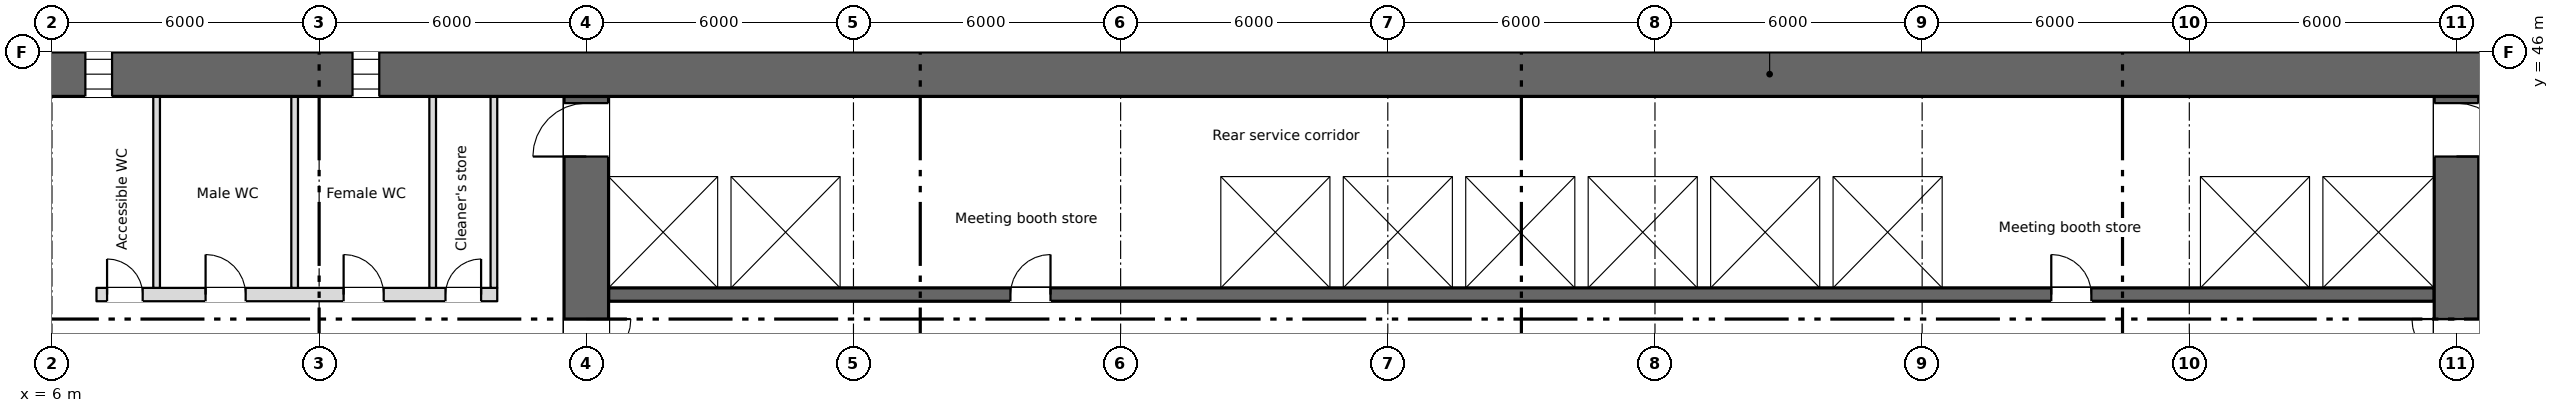
"""IFC4 building model, lengths in metres.
Left out: names, types, materials, properties, quantities, classifications, styles, units other than length and angle.
Written with IfcOpenShell. Run it as: python <this file> out.ifc"""

import sys

from ifc_helpers import new_model, si_unit, direction, frame, frame_2d, origin, place, context, subcontext, project, spatial, rectangle, extrude, element, fill, save


model = new_model("IFC4")
c1 = context("Model", 3, precision=1e-05, world=origin(), true_north=direction((0.0, 1.0)))
c2 = subcontext(c1, "Body", "Model", "MODEL_VIEW")
j1 = project(units=[si_unit("LENGTHUNIT", "METRE"), si_unit("PLANEANGLEUNIT", "RADIAN")], contexts=[c1])
p1 = place(None, origin())
s1 = spatial("IfcSite", under=j1, at=p1, CompositionType="ELEMENT")
p2 = place(p1, origin())
s2 = spatial("IfcBuilding", under=s1, at=p2, CompositionType="ELEMENT")
p3 = place(p2, frame((0.0, 0.0, 26.25)))
s3 = spatial("IfcBuildingStorey", under=s2, at=p3, CompositionType="ELEMENT", Elevation=26.25)
p4 = place(p3, frame((5.55, 45.5, 0.0), z_axis=(0.0, 0.0, 1.0), x_axis=(1.0, 0.0, 0.0)))
e1 = element("IfcWall", 1, at=p4, inside=s3, PredefinedType="SHEAR", context=c2, shape_type="SweptSolid", body=[
    extrude(rectangle(XDim=66.9, YDim=1.0, at=frame_2d((33.45, 0.0))), origin(), (0.0, 0.0, 1.0), 3.35),
])
p5 = place(p4, frame((1.2, 0.0, 0.6)))
e2 = element("IfcOpeningElement", 2, at=p5, cuts=e1, PredefinedType="OPENING", context=c2, shape_type="SweptSolid", body=[
    extrude(rectangle(XDim=0.6, YDim=2.4, at=frame_2d((0.3, 1.2))), frame((0.0, 0.51, 0.0), z_axis=(0.0, -1.0, 0.0), x_axis=(1.0, 0.0, 0.0)), (0.0, 0.0, 1.0), 1.02),
])
p6 = place(p4, frame((7.2, 0.0, 0.6)))
e3 = element("IfcOpeningElement", 3, at=p6, cuts=e1, PredefinedType="OPENING", context=c2, shape_type="SweptSolid", body=[
    extrude(rectangle(XDim=0.6, YDim=2.4, at=frame_2d((0.3, 1.2))), frame((0.0, 0.51, 0.0), z_axis=(0.0, -1.0, 0.0), x_axis=(1.0, 0.0, 0.0)), (0.0, 0.0, 1.0), 1.02),
])
p7 = place(p3, frame((6.85, 28.4, 0.0), z_axis=(0.0, 0.0, 1.0), x_axis=(0.0, 1.0, 0.0)))
e4 = element("IfcWall", 4, at=p7, inside=s3, PredefinedType="SHEAR", context=c2, shape_type="SweptSolid", body=[
    extrude(rectangle(XDim=16.6, YDim=0.3, at=frame_2d((8.3, 0.0))), origin(), (0.0, 0.0, 1.0), 3.35),
])
p8 = place(p3, frame((18.0, 28.4, 0.0), z_axis=(0.0, 0.0, 1.0), x_axis=(0.0, 1.0, 0.0)))
e5 = element("IfcWall", 5, at=p8, inside=s3, PredefinedType="SHEAR", context=c2, shape_type="SweptSolid", body=[
    extrude(rectangle(XDim=16.6, YDim=1.0, at=frame_2d((8.3, 0.0))), origin(), (0.0, 0.0, 1.0), 3.35),
])
p9 = place(p8, frame((9.6, 0.0, 0.0)))
e6 = element("IfcOpeningElement", 6, at=p9, cuts=e5, PredefinedType="OPENING", context=c2, shape_type="SweptSolid", body=[
    extrude(rectangle(XDim=2.0, YDim=2.1, at=frame_2d((1.0, 1.05))), frame((0.0, 0.51, 0.0), z_axis=(0.0, -1.0, 0.0), x_axis=(1.0, 0.0, 0.0)), (0.0, 0.0, 1.0), 1.02),
])
p10 = place(p8, frame((15.25, 0.0, 0.0)))
e7 = element("IfcOpeningElement", 7, at=p10, cuts=e5, PredefinedType="OPENING", context=c2, shape_type="SweptSolid", body=[
    extrude(rectangle(XDim=1.2, YDim=2.1, at=frame_2d((0.6, 1.05))), frame((0.0, 0.51, 0.0), z_axis=(0.0, -1.0, 0.0), x_axis=(1.0, 0.0, 0.0)), (0.0, 0.0, 1.0), 1.02),
])
p11 = place(p3, frame((60.0, 28.4, 0.0), z_axis=(0.0, 0.0, 1.0), x_axis=(0.0, 1.0, 0.0)))
e8 = element("IfcWall", 8, at=p11, inside=s3, PredefinedType="SHEAR", context=c2, shape_type="SweptSolid", body=[
    extrude(rectangle(XDim=16.6, YDim=1.0, at=frame_2d((8.3, 0.0))), origin(), (0.0, 0.0, 1.0), 3.35),
])
p12 = place(p11, frame((9.6, 0.0, 0.0)))
e9 = element("IfcOpeningElement", 9, at=p12, cuts=e8, PredefinedType="OPENING", context=c2, shape_type="SweptSolid", body=[
    extrude(rectangle(XDim=2.0, YDim=2.1, at=frame_2d((1.0, 1.05))), frame((0.0, 0.51, 0.0), z_axis=(0.0, -1.0, 0.0), x_axis=(1.0, 0.0, 0.0)), (0.0, 0.0, 1.0), 1.02),
])
p13 = place(p11, frame((15.25, 0.0, 0.0)))
e10 = element("IfcOpeningElement", 10, at=p13, cuts=e8, PredefinedType="OPENING", context=c2, shape_type="SweptSolid", body=[
    extrude(rectangle(XDim=1.2, YDim=2.1, at=frame_2d((0.6, 1.05))), frame((0.0, 0.51, 0.0), z_axis=(0.0, -1.0, 0.0), x_axis=(1.0, 0.0, 0.0)), (0.0, 0.0, 1.0), 1.02),
])
p14 = place(p3, frame((18.5, 40.55, 0.0), z_axis=(0.0, 0.0, 1.0), x_axis=(1.0, 0.0, 0.0)))
e11 = element("IfcWall", 11, at=p14, inside=s3, PredefinedType="SHEAR", context=c2, shape_type="SweptSolid", body=[
    extrude(rectangle(XDim=41.0, YDim=0.3, at=frame_2d((20.5, 0.0))), origin(), (0.0, 0.0, 1.0), 3.35),
])
p15 = place(p14, frame((9.025, 0.0, 0.0)))
e12 = element("IfcOpeningElement", 12, at=p15, cuts=e11, PredefinedType="OPENING", context=c2, shape_type="SweptSolid", body=[
    extrude(rectangle(XDim=0.9, YDim=2.1, at=frame_2d((0.45, 1.05))), frame((0.0, 0.16, 0.0), z_axis=(0.0, -1.0, 0.0), x_axis=(1.0, 0.0, 0.0)), (0.0, 0.0, 1.0), 0.32),
])
p16 = place(p14, frame((32.4, 0.0, 0.0)))
e13 = element("IfcOpeningElement", 13, at=p16, cuts=e11, PredefinedType="OPENING", context=c2, shape_type="SweptSolid", body=[
    extrude(rectangle(XDim=0.9, YDim=2.1, at=frame_2d((0.45, 1.05))), frame((0.0, 0.16, 0.0), z_axis=(0.0, -1.0, 0.0), x_axis=(1.0, 0.0, 0.0)), (0.0, 0.0, 1.0), 0.32),
])
p17 = place(p14, frame((14.425, 0.0, 0.0)))
e14 = element("IfcOpeningElement", 14, at=p17, cuts=e11, PredefinedType="OPENING", context=c2, shape_type="SweptSolid", body=[
    extrude(rectangle(XDim=1.1, YDim=2.1, at=frame_2d((0.55, 1.05))), frame((0.0, 0.16, 0.0), z_axis=(0.0, -1.0, 0.0), x_axis=(1.0, 0.0, 0.0)), (0.0, 0.0, 1.0), 0.32),
])
p18 = place(p14, frame((17.175, 0.0, 0.0)))
e15 = element("IfcOpeningElement", 15, at=p18, cuts=e11, PredefinedType="OPENING", context=c2, shape_type="SweptSolid", body=[
    extrude(rectangle(XDim=1.1, YDim=2.1, at=frame_2d((0.55, 1.05))), frame((0.0, 0.16, 0.0), z_axis=(0.0, -1.0, 0.0), x_axis=(1.0, 0.0, 0.0)), (0.0, 0.0, 1.0), 0.32),
])
p19 = place(p14, frame((19.925, 0.0, 0.0)))
e16 = element("IfcOpeningElement", 16, at=p19, cuts=e11, PredefinedType="OPENING", context=c2, shape_type="SweptSolid", body=[
    extrude(rectangle(XDim=1.1, YDim=2.1, at=frame_2d((0.55, 1.05))), frame((0.0, 0.16, 0.0), z_axis=(0.0, -1.0, 0.0), x_axis=(1.0, 0.0, 0.0)), (0.0, 0.0, 1.0), 0.32),
])
p20 = place(p14, frame((22.675, 0.0, 0.0)))
e17 = element("IfcOpeningElement", 17, at=p20, cuts=e11, PredefinedType="OPENING", context=c2, shape_type="SweptSolid", body=[
    extrude(rectangle(XDim=1.1, YDim=2.1, at=frame_2d((0.55, 1.05))), frame((0.0, 0.16, 0.0), z_axis=(0.0, -1.0, 0.0), x_axis=(1.0, 0.0, 0.0)), (0.0, 0.0, 1.0), 0.32),
])
p21 = place(p14, frame((36.375, 0.0, 0.0)))
e18 = element("IfcOpeningElement", 18, at=p21, cuts=e11, PredefinedType="OPENING", context=c2, shape_type="SweptSolid", body=[
    extrude(rectangle(XDim=1.2, YDim=2.1, at=frame_2d((0.6, 1.05))), frame((0.0, 0.16, 0.0), z_axis=(0.0, -1.0, 0.0), x_axis=(1.0, 0.0, 0.0)), (0.0, 0.0, 1.0), 0.32),
])
p22 = place(p14, frame((39.15, 0.0, 0.0)))
e19 = element("IfcOpeningElement", 19, at=p22, cuts=e11, PredefinedType="OPENING", context=c2, shape_type="SweptSolid", body=[
    extrude(rectangle(XDim=1.2, YDim=2.1, at=frame_2d((0.6, 1.05))), frame((0.0, 0.16, 0.0), z_axis=(0.0, -1.0, 0.0), x_axis=(1.0, 0.0, 0.0)), (0.0, 0.0, 1.0), 0.32),
])
p23 = place(p3, frame((18.5, 43.35, 0.0), z_axis=(0.0, 0.0, 1.0), x_axis=(1.0, 0.0, 0.0)))
e20 = element("IfcWall", 20, at=p23, inside=s3, PredefinedType="SHEAR", context=c2, shape_type="SweptSolid", body=[
    extrude(rectangle(XDim=41.0, YDim=0.3, at=frame_2d((20.5, 0.0))), origin(), (0.0, 0.0, 1.0), 3.35),
])
p24 = place(p3, frame((7.0, 40.55, 0.0), z_axis=(0.0, 0.0, 1.0), x_axis=(1.0, 0.0, 0.0)))
e21 = element("IfcWall", 21, at=p24, inside=s3, PredefinedType="PARTITIONING", context=c2, shape_type="SweptSolid", body=[
    extrude(rectangle(XDim=9.0, YDim=0.3, at=frame_2d((4.5, 0.0))), origin(), (0.0, 0.0, 1.0), 3.35),
])
p25 = place(p24, frame((0.238, 0.0, 0.0)))
e22 = element("IfcOpeningElement", 22, at=p25, cuts=e21, PredefinedType="OPENING", context=c2, shape_type="SweptSolid", body=[
    extrude(rectangle(XDim=0.8, YDim=2.1, at=frame_2d((0.4, 1.05))), frame((0.0, 0.16, 0.0), z_axis=(0.0, -1.0, 0.0), x_axis=(1.0, 0.0, 0.0)), (0.0, 0.0, 1.0), 0.32),
])
p26 = place(p24, frame((2.45, 0.0, 0.0)))
e23 = element("IfcOpeningElement", 23, at=p26, cuts=e21, PredefinedType="OPENING", context=c2, shape_type="SweptSolid", body=[
    extrude(rectangle(XDim=0.9, YDim=2.1, at=frame_2d((0.45, 1.05))), frame((0.0, 0.16, 0.0), z_axis=(0.0, -1.0, 0.0), x_axis=(1.0, 0.0, 0.0)), (0.0, 0.0, 1.0), 0.32),
])
p27 = place(p24, frame((5.55, 0.0, 0.0)))
e24 = element("IfcOpeningElement", 24, at=p27, cuts=e21, PredefinedType="OPENING", context=c2, shape_type="SweptSolid", body=[
    extrude(rectangle(XDim=0.9, YDim=2.1, at=frame_2d((0.45, 1.05))), frame((0.0, 0.16, 0.0), z_axis=(0.0, -1.0, 0.0), x_axis=(1.0, 0.0, 0.0)), (0.0, 0.0, 1.0), 0.32),
])
p28 = place(p24, frame((7.837, 0.0, 0.0)))
e25 = element("IfcOpeningElement", 25, at=p28, cuts=e21, PredefinedType="OPENING", context=c2, shape_type="SweptSolid", body=[
    extrude(rectangle(XDim=0.8, YDim=2.1, at=frame_2d((0.4, 1.05))), frame((0.0, 0.16, 0.0), z_axis=(0.0, -1.0, 0.0), x_axis=(1.0, 0.0, 0.0)), (0.0, 0.0, 1.0), 0.32),
])
for number, where, z_axis, x_axis in (
    (26, (21.1, 40.7, 0.0), (0.0, 0.0, 1.0), (0.0, 1.0, 0.0)),
    (27, (23.85, 40.7, 0.0), (0.0, 0.0, 1.0), (0.0, 1.0, 0.0)),
    (28, (32.1, 40.7, 0.0), (0.0, 0.0, 1.0), (0.0, 1.0, 0.0)),
    (29, (34.85, 40.7, 0.0), (0.0, 0.0, 1.0), (0.0, 1.0, 0.0)),
    (30, (37.6, 40.7, 0.0), (0.0, 0.0, 1.0), (0.0, 1.0, 0.0)),
    (31, (40.35, 40.7, 0.0), (0.0, 0.0, 1.0), (0.0, 1.0, 0.0)),
    (32, (43.1, 40.7, 0.0), (0.0, 0.0, 1.0), (0.0, 1.0, 0.0)),
    (33, (45.85, 40.7, 0.0), (0.0, 0.0, 1.0), (0.0, 1.0, 0.0)),
    (34, (48.6, 40.7, 0.0), (0.0, 0.0, 1.0), (0.0, 1.0, 0.0)),
    (35, (54.1, 40.7, 0.0), (0.0, 0.0, 1.0), (0.0, 1.0, 0.0)),
    (36, (56.85, 40.7, 0.0), (0.0, 0.0, 1.0), (0.0, 1.0, 0.0)),
):
    element("IfcWall", number, at=place(p3, frame(where, z_axis=z_axis, x_axis=x_axis)), inside=s3, PredefinedType="SHEAR", context=c2, shape_type="SweptSolid", body=[
        extrude(rectangle(XDim=2.5, YDim=0.3, at=frame_2d((1.25, 0.0))), origin(), (0.0, 0.0, 1.0), 3.35),
    ])
for number, where, z_axis, x_axis in (
    (37, (15.925, 40.7, 0.0), (0.0, 0.0, 1.0), (0.0, 1.0, 0.0)),
    (38, (8.35, 40.7, 0.0), (0.0, 0.0, 1.0), (0.0, 1.0, 0.0)),
    (39, (11.45, 40.7, 0.0), (0.0, 0.0, 1.0), (0.0, 1.0, 0.0)),
    (40, (14.55, 40.7, 0.0), (0.0, 0.0, 1.0), (0.0, 1.0, 0.0)),
):
    element("IfcWall", number, at=place(p3, frame(where, z_axis=z_axis, x_axis=x_axis)), inside=s3, PredefinedType="PARTITIONING", context=c2, shape_type="SweptSolid", body=[
        extrude(rectangle(XDim=4.3, YDim=0.15, at=frame_2d((2.15, 0.0))), origin(), (0.0, 0.0, 1.0), 3.35),
    ])
p29 = place(p5, origin())
e41 = element("IfcWindow", 41, at=p29, inside=s3, PartitioningType="SINGLE_PANEL", PredefinedType="WINDOW", context=c2, shape_type="SweptSolid", body=[
    extrude(rectangle(XDim=0.6, YDim=2.4, at=frame_2d((0.3, 1.2))), frame((0.0, 0.03, 0.0), z_axis=(0.0, -1.0, 0.0), x_axis=(1.0, 0.0, 0.0)), (0.0, 0.0, 1.0), 0.06),
])
fill(e2, e41)
p30 = place(p6, origin())
e42 = element("IfcWindow", 42, at=p30, inside=s3, PartitioningType="SINGLE_PANEL", PredefinedType="WINDOW", context=c2, shape_type="SweptSolid", body=[
    extrude(rectangle(XDim=0.6, YDim=2.4, at=frame_2d((0.3, 1.2))), frame((0.0, 0.03, 0.0), z_axis=(0.0, -1.0, 0.0), x_axis=(1.0, 0.0, 0.0)), (0.0, 0.0, 1.0), 0.06),
])
fill(e3, e42)
p31 = place(p25, origin())
e43 = element("IfcDoor", 43, at=p31, inside=s3, OperationType="SINGLE_SWING_LEFT", PredefinedType="DOOR", context=c2, shape_type="SweptSolid", body=[
    extrude(rectangle(XDim=0.8, YDim=2.1, at=frame_2d((0.4, 1.05))), frame((0.0, 0.025, 0.0), z_axis=(0.0, -1.0, 0.0), x_axis=(1.0, 0.0, 0.0)), (0.0, 0.0, 1.0), 0.05),
])
fill(e22, e43)
p32 = place(p26, origin())
e44 = element("IfcDoor", 44, at=p32, inside=s3, OperationType="SINGLE_SWING_LEFT", PredefinedType="DOOR", context=c2, shape_type="SweptSolid", body=[
    extrude(rectangle(XDim=0.9, YDim=2.1, at=frame_2d((0.45, 1.05))), frame((0.0, 0.025, 0.0), z_axis=(0.0, -1.0, 0.0), x_axis=(1.0, 0.0, 0.0)), (0.0, 0.0, 1.0), 0.05),
])
fill(e23, e44)
p33 = place(p27, origin())
e45 = element("IfcDoor", 45, at=p33, inside=s3, OperationType="SINGLE_SWING_LEFT", PredefinedType="DOOR", context=c2, shape_type="SweptSolid", body=[
    extrude(rectangle(XDim=0.9, YDim=2.1, at=frame_2d((0.45, 1.05))), frame((0.0, 0.025, 0.0), z_axis=(0.0, -1.0, 0.0), x_axis=(1.0, 0.0, 0.0)), (0.0, 0.0, 1.0), 0.05),
])
fill(e24, e45)
p34 = place(p28, origin())
e46 = element("IfcDoor", 46, at=p34, inside=s3, OperationType="SINGLE_SWING_RIGHT", PredefinedType="DOOR", context=c2, shape_type="SweptSolid", body=[
    extrude(rectangle(XDim=0.8, YDim=2.1, at=frame_2d((0.4, 1.05))), frame((0.0, 0.025, 0.0), z_axis=(0.0, -1.0, 0.0), x_axis=(1.0, 0.0, 0.0)), (0.0, 0.0, 1.0), 0.05),
])
fill(e25, e46)
p35 = place(p15, origin())
e47 = element("IfcDoor", 47, at=p35, inside=s3, OperationType="SINGLE_SWING_RIGHT", PredefinedType="DOOR", context=c2, shape_type="SweptSolid", body=[
    extrude(rectangle(XDim=0.9, YDim=2.1, at=frame_2d((0.45, 1.05))), frame((0.0, 0.025, 0.0), z_axis=(0.0, -1.0, 0.0), x_axis=(1.0, 0.0, 0.0)), (0.0, 0.0, 1.0), 0.05),
])
fill(e12, e47)
p36 = place(p16, origin())
e48 = element("IfcDoor", 48, at=p36, inside=s3, OperationType="SINGLE_SWING_LEFT", PredefinedType="DOOR", context=c2, shape_type="SweptSolid", body=[
    extrude(rectangle(XDim=0.9, YDim=2.1, at=frame_2d((0.45, 1.05))), frame((0.0, 0.025, 0.0), z_axis=(0.0, -1.0, 0.0), x_axis=(1.0, 0.0, 0.0)), (0.0, 0.0, 1.0), 0.05),
])
fill(e13, e48)
p37 = place(p17, origin())
e49 = element("IfcDoor", 49, at=p37, inside=s3, OperationType="SLIDING_TO_LEFT", PredefinedType="DOOR", context=c2, shape_type="SweptSolid", body=[
    extrude(rectangle(XDim=1.1, YDim=2.1, at=frame_2d((0.55, 1.05))), frame((0.0, 0.025, 0.0), z_axis=(0.0, -1.0, 0.0), x_axis=(1.0, 0.0, 0.0)), (0.0, 0.0, 1.0), 0.05),
])
fill(e14, e49)
p38 = place(p18, origin())
e50 = element("IfcDoor", 50, at=p38, inside=s3, OperationType="SLIDING_TO_LEFT", PredefinedType="DOOR", context=c2, shape_type="SweptSolid", body=[
    extrude(rectangle(XDim=1.1, YDim=2.1, at=frame_2d((0.55, 1.05))), frame((0.0, 0.025, 0.0), z_axis=(0.0, -1.0, 0.0), x_axis=(1.0, 0.0, 0.0)), (0.0, 0.0, 1.0), 0.05),
])
fill(e15, e50)
p39 = place(p19, origin())
e51 = element("IfcDoor", 51, at=p39, inside=s3, OperationType="SLIDING_TO_LEFT", PredefinedType="DOOR", context=c2, shape_type="SweptSolid", body=[
    extrude(rectangle(XDim=1.1, YDim=2.1, at=frame_2d((0.55, 1.05))), frame((0.0, 0.025, 0.0), z_axis=(0.0, -1.0, 0.0), x_axis=(1.0, 0.0, 0.0)), (0.0, 0.0, 1.0), 0.05),
])
fill(e16, e51)
p40 = place(p20, origin())
e52 = element("IfcDoor", 52, at=p40, inside=s3, OperationType="SLIDING_TO_LEFT", PredefinedType="DOOR", context=c2, shape_type="SweptSolid", body=[
    extrude(rectangle(XDim=1.1, YDim=2.1, at=frame_2d((0.55, 1.05))), frame((0.0, 0.025, 0.0), z_axis=(0.0, -1.0, 0.0), x_axis=(1.0, 0.0, 0.0)), (0.0, 0.0, 1.0), 0.05),
])
fill(e17, e52)
p41 = place(p21, origin())
e53 = element("IfcDoor", 53, at=p41, inside=s3, OperationType="SLIDING_TO_LEFT", PredefinedType="DOOR", context=c2, shape_type="SweptSolid", body=[
    extrude(rectangle(XDim=1.2, YDim=2.1, at=frame_2d((0.6, 1.05))), frame((0.0, 0.025, 0.0), z_axis=(0.0, -1.0, 0.0), x_axis=(1.0, 0.0, 0.0)), (0.0, 0.0, 1.0), 0.05),
])
fill(e18, e53)
p42 = place(p22, origin())
e54 = element("IfcDoor", 54, at=p42, inside=s3, OperationType="SLIDING_TO_LEFT", PredefinedType="DOOR", context=c2, shape_type="SweptSolid", body=[
    extrude(rectangle(XDim=1.2, YDim=2.1, at=frame_2d((0.6, 1.05))), frame((0.0, 0.025, 0.0), z_axis=(0.0, -1.0, 0.0), x_axis=(1.0, 0.0, 0.0)), (0.0, 0.0, 1.0), 0.05),
])
fill(e19, e54)
p43 = place(p9, origin())
e55 = element("IfcDoor", 55, at=p43, inside=s3, OperationType="DOUBLE_DOOR_SINGLE_SWING", PredefinedType="DOOR", context=c2, shape_type="SweptSolid", body=[
    extrude(rectangle(XDim=2.0, YDim=2.1, at=frame_2d((1.0, 1.05))), frame((0.0, 0.025, 0.0), z_axis=(0.0, -1.0, 0.0), x_axis=(1.0, 0.0, 0.0)), (0.0, 0.0, 1.0), 0.05),
])
fill(e6, e55)
p44 = place(p12, origin())
e56 = element("IfcDoor", 56, at=p44, inside=s3, OperationType="DOUBLE_DOOR_SINGLE_SWING", PredefinedType="DOOR", context=c2, shape_type="SweptSolid", body=[
    extrude(rectangle(XDim=2.0, YDim=2.1, at=frame_2d((1.0, 1.05))), frame((0.0, 0.025, 0.0), z_axis=(0.0, -1.0, 0.0), x_axis=(1.0, 0.0, 0.0)), (0.0, 0.0, 1.0), 0.05),
])
fill(e9, e56)
p45 = place(p10, origin())
e57 = element("IfcDoor", 57, at=p45, inside=s3, OperationType="SINGLE_SWING_LEFT", PredefinedType="DOOR", context=c2, shape_type="SweptSolid", body=[
    extrude(rectangle(XDim=1.2, YDim=2.1, at=frame_2d((0.6, 1.05))), frame((0.0, 0.025, 0.0), z_axis=(0.0, -1.0, 0.0), x_axis=(1.0, 0.0, 0.0)), (0.0, 0.0, 1.0), 0.05),
])
fill(e7, e57)
p46 = place(p13, origin())
e58 = element("IfcDoor", 58, at=p46, inside=s3, OperationType="SINGLE_SWING_LEFT", PredefinedType="DOOR", context=c2, shape_type="SweptSolid", body=[
    extrude(rectangle(XDim=1.2, YDim=2.1, at=frame_2d((0.6, 1.05))), frame((0.0, 0.025, 0.0), z_axis=(0.0, -1.0, 0.0), x_axis=(1.0, 0.0, 0.0)), (0.0, 0.0, 1.0), 0.05),
])
fill(e10, e58)
save(model, sys.argv[1])
